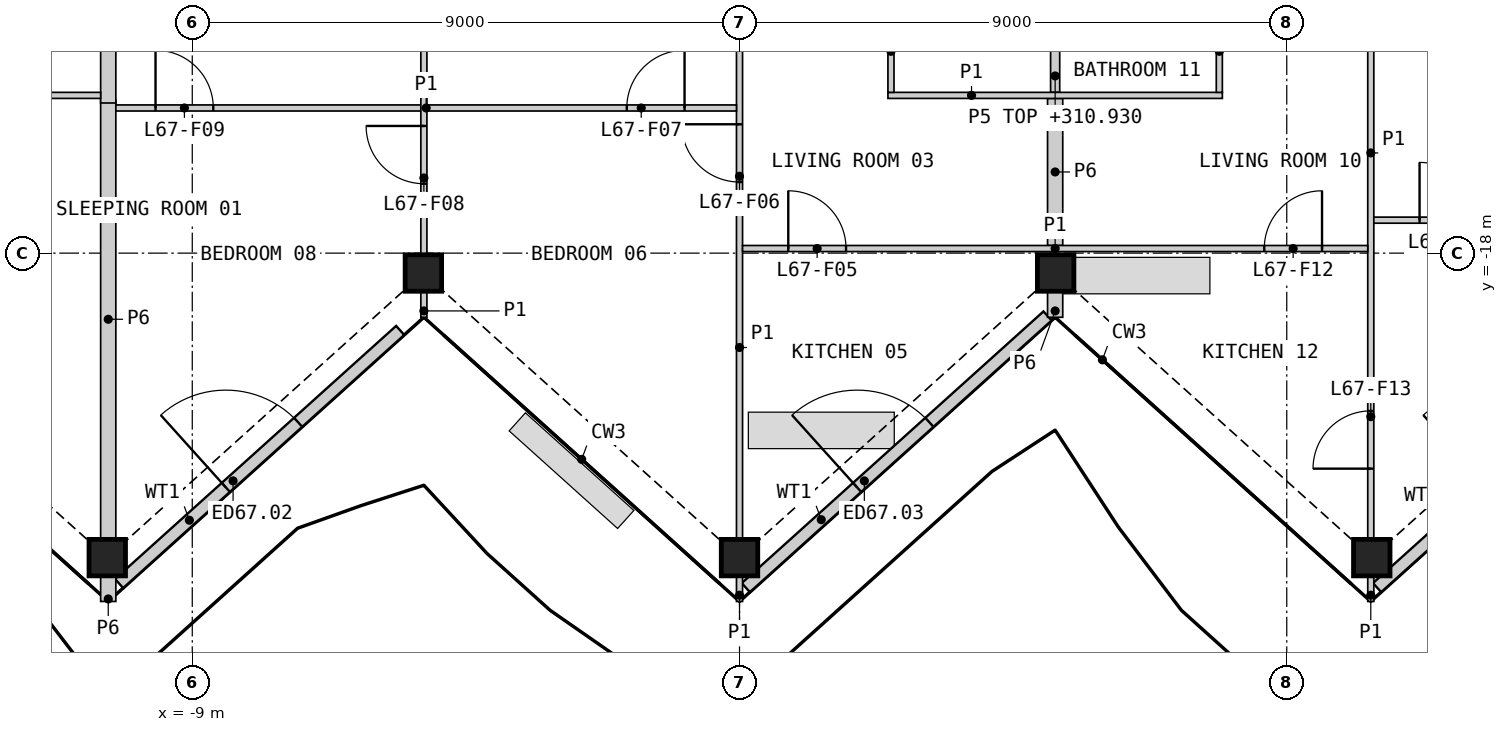
"""IFC4 building model, lengths in metres.
Left out: names, types, materials, properties, quantities, classifications, styles, units other than length and angle.
Written with IfcOpenShell. Run it as: python <this file> out.ifc"""

import sys

from ifc_helpers import new_model, si_unit, direction, frame, frame_2d, origin, origin_2d, place, context, subcontext, project, spatial, rectangle, hollow_rectangle, extrude, element, fill, save


model = new_model("IFC4")
c1 = context("Model", 3, precision=1e-05, world=origin(), true_north=direction((0.0, 1.0)))
c2 = subcontext(c1, "Body", "Model", "MODEL_VIEW")
j1 = project(units=[si_unit("LENGTHUNIT", "METRE"), si_unit("PLANEANGLEUNIT", "RADIAN")], contexts=[c1])
p1 = place(None, origin())
s1 = spatial("IfcSite", under=j1, at=p1, CompositionType="ELEMENT")
p2 = place(p1, origin())
s2 = spatial("IfcBuilding", under=s1, at=p2, CompositionType="ELEMENT")
p3 = place(p2, frame((0.0, 0.0, 308.6)))
s3 = spatial("IfcBuildingStorey", under=s2, at=p3, CompositionType="ELEMENT", Elevation=308.6)
for number, where, z_axis, x_axis in (
    (1, (-10.398, -23.008, 0.0), (0.0, 0.0, 1.0), (1.0, 0.0, 0.0)),
    (2, (-5.199, -18.327, 0.0), (0.0, 0.0, 1.0), (1.0, 0.0, 0.0)),
    (3, (0.0, -23.008, 0.0), (0.0, 0.0, 1.0), (1.0, 0.0, 0.0)),
    (4, (5.199, -18.327, 0.0), (0.0, 0.0, 1.0), (1.0, 0.0, 0.0)),
    (5, (10.398, -23.008, 0.0), (0.0, 0.0, 1.0), (1.0, 0.0, 0.0)),
):
    element("IfcColumn", number, at=place(p3, frame(where, z_axis=z_axis, x_axis=x_axis)), inside=s3, PredefinedType="COLUMN", context=c2, shape_type="SweptSolid", body=[
        extrude(hollow_rectangle(XDim=0.6, YDim=0.6, WallThickness=0.04, at=origin_2d()), origin(), (0.0, 0.0, 1.0), 3.4),
    ])
p4 = place(p3, frame((-10.203, -23.434, 0.0), z_axis=(0.0, 0.0, 1.0), x_axis=(0.74314582041, 0.669129501373, 0.0)))
e6 = element("IfcWall", 6, at=p4, inside=s3, PredefinedType="SOLIDWALL", context=c2, shape_type="SweptSolid", body=[
    extrude(rectangle(XDim=6.221, YDim=0.2, at=frame_2d((3.11, 0.0))), origin(), (0.0, 0.0, 1.0), 2.488),
])
p5 = place(p4, frame((2.362, 0.0, 0.0)))
e7 = element("IfcOpeningElement", 7, at=p5, cuts=e6, PredefinedType="OPENING", context=c2, shape_type="SweptSolid", body=[
    extrude(rectangle(XDim=1.6, YDim=2.25, at=frame_2d((0.8, 1.125))), frame((0.0, 0.11, 0.0), z_axis=(0.0, -1.0, 0.0), x_axis=(1.0, 0.0, 0.0)), (0.0, 0.0, 1.0), 0.22),
])
p6 = place(p3, frame((0.104, -23.501, 0.0), z_axis=(0.0, 0.0, 1.0), x_axis=(0.743137782456, 0.669138428344, 0.0)))
e8 = element("IfcWall", 8, at=p6, inside=s3, PredefinedType="SOLIDWALL", context=c2, shape_type="SweptSolid", body=[
    extrude(rectangle(XDim=6.678, YDim=0.2, at=frame_2d((3.339, 0.0))), origin(), (0.0, 0.0, 1.0), 2.488),
])
p7 = place(p6, frame((2.463, 0.0, 0.0)))
e9 = element("IfcOpeningElement", 9, at=p7, cuts=e8, PredefinedType="OPENING", context=c2, shape_type="SweptSolid", body=[
    extrude(rectangle(XDim=1.6, YDim=2.25, at=frame_2d((0.8, 1.125))), frame((0.0, 0.11, 0.0), z_axis=(0.0, -1.0, 0.0), x_axis=(1.0, 0.0, 0.0)), (0.0, 0.0, 1.0), 0.22),
])
p8 = place(p3, frame((10.485, -23.501, 0.0), z_axis=(0.0, 0.0, 1.0), x_axis=(0.743134744054, 0.669141802745, 0.0)))
e10 = element("IfcWall", 10, at=p8, inside=s3, PredefinedType="SOLIDWALL", context=c2, shape_type="SweptSolid", body=[
    extrude(rectangle(XDim=6.322, YDim=0.2, at=frame_2d((3.161, 0.0))), origin(), (0.0, 0.0, 1.0), 2.488),
])
p9 = place(p8, frame((2.463, 0.0, 0.0)))
e11 = element("IfcOpeningElement", 11, at=p9, cuts=e10, PredefinedType="OPENING", context=c2, shape_type="SweptSolid", body=[
    extrude(rectangle(XDim=1.6, YDim=2.25, at=frame_2d((0.8, 1.125))), frame((0.0, 0.11, 0.0), z_axis=(0.0, -1.0, 0.0), x_axis=(1.0, 0.0, 0.0)), (0.0, 0.0, 1.0), 0.22),
])
p10 = place(p3, frame((-10.382, -22.698, 0.0), z_axis=(0.0, 0.0, 1.0), x_axis=(0.0, 1.0, 0.0)))
e12 = element("IfcWall", 12, at=p10, inside=s3, PredefinedType="PARTITIONING", context=c2, shape_type="SweptSolid", body=[
    extrude(rectangle(XDim=7.22, YDim=0.25, at=frame_2d((3.61, 0.0))), origin(), (0.0, 0.0, 1.0), 2.33),
])
p11 = place(p3, frame((-10.382, -15.531, 0.0), z_axis=(0.0, 0.0, 1.0), x_axis=(0.0, 1.0, 0.0)))
e13 = element("IfcWall", 13, at=p11, inside=s3, PredefinedType="PARTITIONING", context=c2, shape_type="SweptSolid", body=[
    extrude(rectangle(XDim=5.525, YDim=0.25, at=frame_2d((2.762, 0.0))), origin(), (0.0, 0.0, 1.0), 2.33),
])
p12 = place(p3, frame((5.191, -17.875, 0.0), z_axis=(0.0, 0.0, 1.0), x_axis=(0.0, 1.0, 0.0)))
e14 = element("IfcWall", 14, at=p12, inside=s3, PredefinedType="PARTITIONING", context=c2, shape_type="SweptSolid", body=[
    extrude(rectangle(XDim=2.419, YDim=0.25, at=frame_2d((1.209, 0.0))), origin(), (0.0, 0.0, 1.0), 2.33),
])
p13 = place(p3, frame((5.191, -19.055, 0.0), z_axis=(0.0, 0.0, 1.0), x_axis=(0.0, 1.0, 0.0)))
e15 = element("IfcWall", 15, at=p13, inside=s3, PredefinedType="PARTITIONING", context=c2, shape_type="SweptSolid", body=[
    extrude(rectangle(XDim=0.418, YDim=0.25, at=frame_2d((0.209, 0.0))), origin(), (0.0, 0.0, 1.0), 2.33),
])
p14 = place(p3, frame((-10.382, -23.729, 0.0), z_axis=(0.0, 0.0, 1.0), x_axis=(0.0, 1.0, 0.0)))
e16 = element("IfcWall", 16, at=p14, inside=s3, PredefinedType="PARTITIONING", context=c2, shape_type="SweptSolid", body=[
    extrude(rectangle(XDim=0.411, YDim=0.25, at=frame_2d((0.206, 0.0))), origin(), (0.0, 0.0, 1.0), 2.33),
])
p15 = place(p3, frame((5.191, -15.356, 0.0), z_axis=(0.0, 0.0, 1.0), x_axis=(0.0, 1.0, 0.0)))
e17 = element("IfcWall", 17, at=p15, inside=s3, PredefinedType="PLUMBINGWALL", context=c2, shape_type="SweptSolid", body=[
    extrude(rectangle(XDim=2.7, YDim=0.15, at=frame_2d((1.35, 0.0))), origin(), (0.0, 0.0, 1.0), 2.33),
])
p16 = place(p3, frame((10.382, -22.698, 0.0), z_axis=(0.0, 0.0, 1.0), x_axis=(0.0, 1.0, 0.0)))
e18 = element("IfcWall", 18, at=p16, inside=s3, PredefinedType="PARTITIONING", context=c2, shape_type="SweptSolid", body=[
    extrude(rectangle(XDim=12.692, YDim=0.1, at=frame_2d((6.346, 0.0))), origin(), (0.0, 0.0, 1.0), 2.33),
])
p17 = place(p16, frame((1.153, 0.0, 0.0)))
e19 = element("IfcOpeningElement", 19, at=p17, cuts=e18, PredefinedType="OPENING", context=c2, shape_type="SweptSolid", body=[
    extrude(rectangle(XDim=0.95, YDim=2.1, at=frame_2d((0.475, 1.05))), frame((0.0, 0.06, 0.0), z_axis=(0.0, -1.0, 0.0), x_axis=(1.0, 0.0, 0.0)), (0.0, 0.0, 1.0), 0.12),
])
p18 = place(p3, frame((0.0, -22.698, 0.0), z_axis=(0.0, 0.0, 1.0), x_axis=(0.0, 1.0, 0.0)))
e20 = element("IfcWall", 20, at=p18, inside=s3, PredefinedType="PARTITIONING", context=c2, shape_type="SweptSolid", body=[
    extrude(rectangle(XDim=12.585, YDim=0.1, at=frame_2d((6.292, 0.0))), origin(), (0.0, 0.0, 1.0), 2.33),
])
p19 = place(p18, frame((5.868, 0.0, 0.0)))
e21 = element("IfcOpeningElement", 21, at=p19, cuts=e20, PredefinedType="OPENING", context=c2, shape_type="SweptSolid", body=[
    extrude(rectangle(XDim=0.95, YDim=2.1, at=frame_2d((0.475, 1.05))), frame((0.0, 0.06, 0.0), z_axis=(0.0, -1.0, 0.0), x_axis=(1.0, 0.0, 0.0)), (0.0, 0.0, 1.0), 0.12),
])
p20 = place(p3, frame((0.05, -17.924, 0.0), z_axis=(0.0, 0.0, 1.0), x_axis=(1.0, 0.0, 0.0)))
e22 = element("IfcWall", 22, at=p20, inside=s3, PredefinedType="PARTITIONING", context=c2, shape_type="SweptSolid", body=[
    extrude(rectangle(XDim=10.282, YDim=0.1, at=frame_2d((5.141, 0.0))), origin(), (0.0, 0.0, 1.0), 2.33),
])
p21 = place(p20, frame((0.752, 0.0, 0.0)))
e23 = element("IfcOpeningElement", 23, at=p21, cuts=e22, PredefinedType="OPENING", context=c2, shape_type="SweptSolid", body=[
    extrude(rectangle(XDim=0.95, YDim=2.1, at=frame_2d((0.475, 1.05))), frame((0.0, 0.06, 0.0), z_axis=(0.0, -1.0, 0.0), x_axis=(1.0, 0.0, 0.0)), (0.0, 0.0, 1.0), 0.12),
])
p22 = place(p20, frame((8.58, 0.0, 0.0)))
e24 = element("IfcOpeningElement", 24, at=p22, cuts=e22, PredefinedType="OPENING", context=c2, shape_type="SweptSolid", body=[
    extrude(rectangle(XDim=0.95, YDim=2.1, at=frame_2d((0.475, 1.05))), frame((0.0, 0.06, 0.0), z_axis=(0.0, -1.0, 0.0), x_axis=(1.0, 0.0, 0.0)), (0.0, 0.0, 1.0), 0.12),
])
p23 = place(p3, frame((-10.257, -15.613, 0.0), z_axis=(0.0, 0.0, 1.0), x_axis=(1.0, 0.0, 0.0)))
e25 = element("IfcWall", 25, at=p23, inside=s3, PredefinedType="PARTITIONING", context=c2, shape_type="SweptSolid", body=[
    extrude(rectangle(XDim=10.207, YDim=0.1, at=frame_2d((5.104, 0.0))), origin(), (0.0, 0.0, 1.0), 2.33),
])
p24 = place(p23, frame((8.403, 0.0, 0.0)))
e26 = element("IfcOpeningElement", 26, at=p24, cuts=e25, PredefinedType="OPENING", context=c2, shape_type="SweptSolid", body=[
    extrude(rectangle(XDim=0.95, YDim=2.1, at=frame_2d((0.475, 1.05))), frame((0.0, 0.06, 0.0), z_axis=(0.0, -1.0, 0.0), x_axis=(1.0, 0.0, 0.0)), (0.0, 0.0, 1.0), 0.12),
])
p25 = place(p23, frame((0.653, 0.0, 0.0)))
e27 = element("IfcOpeningElement", 27, at=p25, cuts=e25, PredefinedType="OPENING", context=c2, shape_type="SweptSolid", body=[
    extrude(rectangle(XDim=0.95, YDim=2.1, at=frame_2d((0.475, 1.05))), frame((0.0, 0.06, 0.0), z_axis=(0.0, -1.0, 0.0), x_axis=(1.0, 0.0, 0.0)), (0.0, 0.0, 1.0), 0.12),
])
p26 = place(p3, frame((-5.191, -18.017, 0.0), z_axis=(0.0, 0.0, 1.0), x_axis=(0.0, 1.0, 0.0)))
e28 = element("IfcWall", 28, at=p26, inside=s3, PredefinedType="PARTITIONING", context=c2, shape_type="SweptSolid", body=[
    extrude(rectangle(XDim=8.011, YDim=0.1, at=frame_2d((4.006, 0.0))), origin(), (0.0, 0.0, 1.0), 2.33),
])
p27 = place(p26, frame((1.158, 0.0, 0.0)))
e29 = element("IfcOpeningElement", 29, at=p27, cuts=e28, PredefinedType="OPENING", context=c2, shape_type="SweptSolid", body=[
    extrude(rectangle(XDim=0.95, YDim=2.1, at=frame_2d((0.475, 1.05))), frame((0.0, 0.06, 0.0), z_axis=(0.0, -1.0, 0.0), x_axis=(1.0, 0.0, 0.0)), (0.0, 0.0, 1.0), 0.12),
])
p28 = place(p3, frame((10.432, -17.458, 0.0), z_axis=(0.0, 0.0, 1.0), x_axis=(1.0, 0.0, 0.0)))
e30 = element("IfcWall", 30, at=p28, inside=s3, PredefinedType="PARTITIONING", context=c2, shape_type="SweptSolid", body=[
    extrude(rectangle(XDim=6.775, YDim=0.1, at=frame_2d((3.387, 0.0))), origin(), (0.0, 0.0, 1.0), 2.33),
])
p29 = place(p28, frame((0.752, 0.0, 0.0)))
e31 = element("IfcOpeningElement", 31, at=p29, cuts=e30, PredefinedType="OPENING", context=c2, shape_type="SweptSolid", body=[
    extrude(rectangle(XDim=0.95, YDim=2.1, at=frame_2d((0.475, 1.05))), frame((0.0, 0.06, 0.0), z_axis=(0.0, -1.0, 0.0), x_axis=(1.0, 0.0, 0.0)), (0.0, 0.0, 1.0), 0.12),
])
p30 = place(p3, frame((2.441, -15.406, 0.0), z_axis=(0.0, 0.0, 1.0), x_axis=(1.0, 0.0, 0.0)))
e32 = element("IfcWall", 32, at=p30, inside=s3, PredefinedType="PARTITIONING", context=c2, shape_type="SweptSolid", body=[
    extrude(rectangle(XDim=5.5, YDim=0.1, at=frame_2d((2.75, 0.0))), origin(), (0.0, 0.0, 1.0), 2.33),
])
p31 = place(p3, frame((2.491, -15.356, 0.0), z_axis=(0.0, 0.0, 1.0), x_axis=(0.0, 1.0, 0.0)))
e33 = element("IfcWall", 33, at=p31, inside=s3, PredefinedType="PARTITIONING", context=c2, shape_type="SweptSolid", body=[
    extrude(rectangle(XDim=2.7, YDim=0.1, at=frame_2d((1.35, 0.0))), origin(), (0.0, 0.0, 1.0), 2.33),
])
p32 = place(p31, frame((0.875, 0.0, 0.0)))
e34 = element("IfcOpeningElement", 34, at=p32, cuts=e33, PredefinedType="OPENING", context=c2, shape_type="SweptSolid", body=[
    extrude(rectangle(XDim=0.95, YDim=2.1, at=frame_2d((0.475, 1.05))), frame((0.0, 0.06, 0.0), z_axis=(0.0, -1.0, 0.0), x_axis=(1.0, 0.0, 0.0)), (0.0, 0.0, 1.0), 0.12),
])
p33 = place(p3, frame((7.891, -15.356, 0.0), z_axis=(0.0, 0.0, 1.0), x_axis=(0.0, 1.0, 0.0)))
e35 = element("IfcWall", 35, at=p33, inside=s3, PredefinedType="PARTITIONING", context=c2, shape_type="SweptSolid", body=[
    extrude(rectangle(XDim=2.7, YDim=0.1, at=frame_2d((1.35, 0.0))), origin(), (0.0, 0.0, 1.0), 2.33),
])
p34 = place(p33, frame((0.875, 0.0, 0.0)))
e36 = element("IfcOpeningElement", 36, at=p34, cuts=e35, PredefinedType="OPENING", context=c2, shape_type="SweptSolid", body=[
    extrude(rectangle(XDim=0.95, YDim=2.1, at=frame_2d((0.475, 1.05))), frame((0.0, 0.06, 0.0), z_axis=(0.0, -1.0, 0.0), x_axis=(1.0, 0.0, 0.0)), (0.0, 0.0, 1.0), 0.12),
])
p35 = place(p3, frame((-13.032, -15.406, 0.0), z_axis=(0.0, 0.0, 1.0), x_axis=(1.0, 0.0, 0.0)))
e37 = element("IfcWall", 37, at=p35, inside=s3, PredefinedType="PARTITIONING", context=c2, shape_type="SweptSolid", body=[
    extrude(rectangle(XDim=2.525, YDim=0.1, at=frame_2d((1.263, 0.0))), origin(), (0.0, 0.0, 1.0), 2.33),
])
p36 = place(p35, frame((0.25, 0.0, 0.0)))
e38 = element("IfcOpeningElement", 38, at=p36, cuts=e37, PredefinedType="OPENING", context=c2, shape_type="SweptSolid", body=[
    extrude(rectangle(XDim=0.95, YDim=2.1, at=frame_2d((0.475, 1.05))), frame((0.0, 0.06, 0.0), z_axis=(0.0, -1.0, 0.0), x_axis=(1.0, 0.0, 0.0)), (0.0, 0.0, 1.0), 0.12),
])
p37 = place(p3, frame((-5.191, -19.055, 0.0), z_axis=(0.0, 0.0, 1.0), x_axis=(0.0, 1.0, 0.0)))
e39 = element("IfcWall", 39, at=p37, inside=s3, PredefinedType="PARTITIONING", context=c2, shape_type="SweptSolid", body=[
    extrude(rectangle(XDim=0.418, YDim=0.1, at=frame_2d((0.209, 0.0))), origin(), (0.0, 0.0, 1.0), 2.33),
])
for number, where, z_axis, x_axis in (
    (40, (0.0, -23.729, 0.0), (0.0, 0.0, 1.0), (0.0, 1.0, 0.0)),
    (41, (10.382, -23.729, 0.0), (0.0, 0.0, 1.0), (0.0, 1.0, 0.0)),
):
    element("IfcWall", number, at=place(p3, frame(where, z_axis=z_axis, x_axis=x_axis)), inside=s3, PredefinedType="PARTITIONING", context=c2, shape_type="SweptSolid", body=[
        extrude(rectangle(XDim=0.411, YDim=0.1, at=frame_2d((0.206, 0.0))), origin(), (0.0, 0.0, 1.0), 2.33),
    ])
p38 = place(p5, origin())
e42 = element("IfcDoor", 42, at=p38, inside=s3, OperationType="DOUBLE_DOOR_SINGLE_SWING", PredefinedType="DOOR", context=c2, shape_type="SweptSolid", body=[
    extrude(rectangle(XDim=1.6, YDim=2.25, at=frame_2d((0.8, 1.125))), frame((0.0, 0.025, 0.0), z_axis=(0.0, -1.0, 0.0), x_axis=(1.0, 0.0, 0.0)), (0.0, 0.0, 1.0), 0.05),
])
fill(e7, e42)
p39 = place(p7, origin())
e43 = element("IfcDoor", 43, at=p39, inside=s3, OperationType="DOUBLE_DOOR_SINGLE_SWING", PredefinedType="DOOR", context=c2, shape_type="SweptSolid", body=[
    extrude(rectangle(XDim=1.6, YDim=2.25, at=frame_2d((0.8, 1.125))), frame((0.0, 0.025, 0.0), z_axis=(0.0, -1.0, 0.0), x_axis=(1.0, 0.0, 0.0)), (0.0, 0.0, 1.0), 0.05),
])
fill(e9, e43)
p40 = place(p21, origin())
e44 = element("IfcDoor", 44, at=p40, inside=s3, OperationType="SINGLE_SWING_LEFT", PredefinedType="DOOR", context=c2, shape_type="SweptSolid", body=[
    extrude(rectangle(XDim=0.95, YDim=2.1, at=frame_2d((0.475, 1.05))), frame((0.0, 0.025, 0.0), z_axis=(0.0, -1.0, 0.0), x_axis=(1.0, 0.0, 0.0)), (0.0, 0.0, 1.0), 0.05),
])
fill(e23, e44)
p41 = place(p19, origin())
e45 = element("IfcDoor", 45, at=p41, inside=s3, OperationType="SINGLE_SWING_RIGHT", PredefinedType="DOOR", context=c2, shape_type="SweptSolid", body=[
    extrude(rectangle(XDim=0.95, YDim=2.1, at=frame_2d((0.475, 1.05))), frame((0.0, 0.025, 0.0), z_axis=(0.0, -1.0, 0.0), x_axis=(1.0, 0.0, 0.0)), (0.0, 0.0, 1.0), 0.05),
])
fill(e21, e45)
p42 = place(p24, origin())
e46 = element("IfcDoor", 46, at=p42, inside=s3, OperationType="SINGLE_SWING_RIGHT", PredefinedType="DOOR", context=c2, shape_type="SweptSolid", body=[
    extrude(rectangle(XDim=0.95, YDim=2.1, at=frame_2d((0.475, 1.05))), frame((0.0, 0.025, 0.0), z_axis=(0.0, -1.0, 0.0), x_axis=(1.0, 0.0, 0.0)), (0.0, 0.0, 1.0), 0.05),
])
fill(e26, e46)
p43 = place(p27, origin())
e47 = element("IfcDoor", 47, at=p43, inside=s3, OperationType="SINGLE_SWING_RIGHT", PredefinedType="DOOR", context=c2, shape_type="SweptSolid", body=[
    extrude(rectangle(XDim=0.95, YDim=2.1, at=frame_2d((0.475, 1.05))), frame((0.0, 0.025, 0.0), z_axis=(0.0, -1.0, 0.0), x_axis=(1.0, 0.0, 0.0)), (0.0, 0.0, 1.0), 0.05),
])
fill(e29, e47)
p44 = place(p25, origin())
e48 = element("IfcDoor", 48, at=p44, inside=s3, OperationType="SINGLE_SWING_LEFT", PredefinedType="DOOR", context=c2, shape_type="SweptSolid", body=[
    extrude(rectangle(XDim=0.95, YDim=2.1, at=frame_2d((0.475, 1.05))), frame((0.0, 0.025, 0.0), z_axis=(0.0, -1.0, 0.0), x_axis=(1.0, 0.0, 0.0)), (0.0, 0.0, 1.0), 0.05),
])
fill(e27, e48)
p45 = place(p22, origin())
e49 = element("IfcDoor", 49, at=p45, inside=s3, OperationType="SINGLE_SWING_RIGHT", PredefinedType="DOOR", context=c2, shape_type="SweptSolid", body=[
    extrude(rectangle(XDim=0.95, YDim=2.1, at=frame_2d((0.475, 1.05))), frame((0.0, 0.025, 0.0), z_axis=(0.0, -1.0, 0.0), x_axis=(1.0, 0.0, 0.0)), (0.0, 0.0, 1.0), 0.05),
])
fill(e24, e49)
p46 = place(p17, origin())
e50 = element("IfcDoor", 50, at=p46, inside=s3, OperationType="SINGLE_SWING_LEFT", PredefinedType="DOOR", context=c2, shape_type="SweptSolid", body=[
    extrude(rectangle(XDim=0.95, YDim=2.1, at=frame_2d((0.475, 1.05))), frame((0.0, 0.025, 0.0), z_axis=(0.0, -1.0, 0.0), x_axis=(1.0, 0.0, 0.0)), (0.0, 0.0, 1.0), 0.05),
])
fill(e19, e50)
p47 = place(p29, origin())
e51 = element("IfcDoor", 51, at=p47, inside=s3, OperationType="SINGLE_SWING_LEFT", PredefinedType="DOOR", context=c2, shape_type="SweptSolid", body=[
    extrude(rectangle(XDim=0.95, YDim=2.1, at=frame_2d((0.475, 1.05))), frame((0.0, 0.025, 0.0), z_axis=(0.0, -1.0, 0.0), x_axis=(1.0, 0.0, 0.0)), (0.0, 0.0, 1.0), 0.05),
])
fill(e31, e51)
save(model, sys.argv[1])
